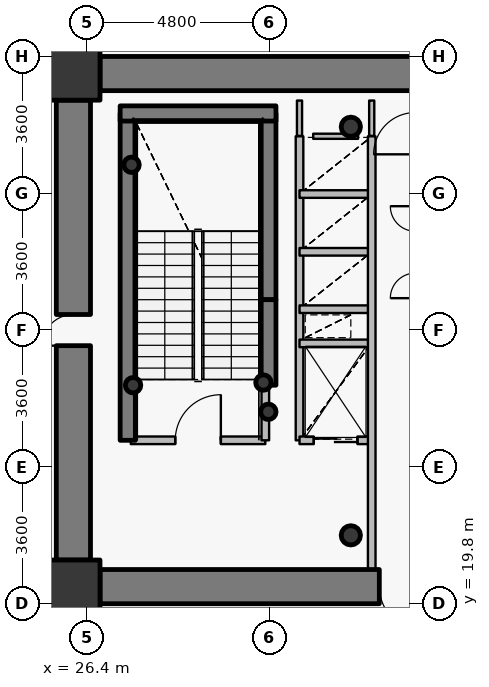
"""IFC4 building model, lengths in metres.
Left out: names, types, materials, properties, quantities, classifications, styles, units other than length and angle.
Written with IfcOpenShell. Run it as: python <this file> out.ifc"""

import sys

from ifc_helpers import new_model, si_unit, direction, frame, frame_2d, origin, origin_2d, place, context, subcontext, project, spatial, rectangle, hollow_circle, extrude, source, transform, mapped, element, fill, save


model = new_model("IFC4")
c1 = context("Model", 3, precision=1e-05, world=origin(), true_north=direction((0.0, 1.0)))
c2 = subcontext(c1, "Body", "Model", "MODEL_VIEW")
j1 = project(units=[si_unit("LENGTHUNIT", "METRE"), si_unit("PLANEANGLEUNIT", "RADIAN")], contexts=[c1])
p1 = place(None, origin())
s1 = spatial("IfcSite", under=j1, at=p1, CompositionType="ELEMENT")
p2 = place(p1, origin())
s2 = spatial("IfcBuilding", under=s1, at=p2, CompositionType="ELEMENT")
p3 = place(p2, frame((0.0, 0.0, 82.8)))
s3 = spatial("IfcBuildingStorey", under=s2, at=p3, CompositionType="ELEMENT", Elevation=82.8)
for number, where, z_axis, x_axis in (
    (1, (26.05, 20.25, 0.0), (0.0, 0.0, 1.0), (1.0, 0.0, 0.0)),
    (2, (26.05, 33.75, 0.0), (0.0, 0.0, 1.0), (1.0, 0.0, 0.0)),
):
    element("IfcColumn", number, at=place(p3, frame(where, z_axis=z_axis, x_axis=x_axis)), inside=s3, PredefinedType="COLUMN", context=c2, shape_type="SweptSolid", body=[
        extrude(rectangle(XDim=1.4, YDim=1.4, at=origin_2d()), origin(), (0.0, 0.0, 1.0), 4.2),
    ])
for number, where, z_axis, x_axis in (
    (3, (33.35, 21.6, 0.0), (0.0, 0.0, 1.0), (1.0, 0.0, 0.0)),
    (4, (33.35, 32.35, 0.0), (0.0, 0.0, 1.0), (1.0, 0.0, 0.0)),
):
    element("IfcColumn", number, at=place(p3, frame(where, z_axis=z_axis, x_axis=x_axis)), inside=s3, PredefinedType="COLUMN", context=c2, shape_type="SweptSolid", body=[
        extrude(hollow_circle(Radius=0.254, WallThickness=0.02, at=origin_2d()), origin(), (0.0, 0.0, 1.0), 4.2),
    ])
p4 = place(p3, frame((27.48, 24.1, 0.0), z_axis=(0.0, 0.0, 1.0), x_axis=(0.0, 1.0, 0.0)))
e5 = element("IfcWall", 5, at=p4, inside=s3, PredefinedType="SHEAR", context=c2, shape_type="SweptSolid", body=[
    extrude(rectangle(XDim=8.6, YDim=0.4, at=frame_2d((4.3, 0.0))), origin(), (0.0, 0.0, 1.0), 4.2),
])
p5 = place(p3, frame((31.18, 27.8, 0.0), z_axis=(0.0, 0.0, 1.0), x_axis=(0.0, 1.0, 0.0)))
e6 = element("IfcWall", 6, at=p5, inside=s3, PredefinedType="SHEAR", context=c2, shape_type="SweptSolid", body=[
    extrude(rectangle(XDim=4.9, YDim=0.4, at=frame_2d((2.45, 0.0))), origin(), (0.0, 0.0, 1.0), 4.2),
])
p6 = place(p3, frame((27.28, 32.7, 0.0), z_axis=(0.0, 0.0, 1.0), x_axis=(1.0, 0.0, 0.0)))
e7 = element("IfcWall", 7, at=p6, inside=s3, PredefinedType="SHEAR", context=c2, shape_type="SweptSolid", body=[
    extrude(rectangle(XDim=4.1, YDim=0.4, at=frame_2d((2.05, 0.0))), origin(), (0.0, 0.0, 1.0), 4.2),
])
for number, where, z_axis, x_axis in (
    (8, (27.58, 31.35, 0.0), (0.0, 0.0, 1.0), (1.0, 0.0, 0.0)),
    (9, (31.05, 25.62, 0.0), (0.0, 0.0, 1.0), (1.0, 0.0, 0.0)),
    (10, (31.18, 24.85, 0.0), (0.0, 0.0, 1.0), (1.0, 0.0, 0.0)),
    (11, (27.62, 25.55, 0.0), (0.0, 0.0, 1.0), (1.0, 0.0, 0.0)),
):
    element("IfcColumn", number, at=place(p3, frame(where, z_axis=z_axis, x_axis=x_axis)), inside=s3, PredefinedType="COLUMN", context=c2, shape_type="SweptSolid", body=[
        extrude(hollow_circle(Radius=0.203, WallThickness=0.016, at=origin_2d()), origin(), (0.0, 0.0, 1.0), 4.2),
    ])
p7 = place(p3, frame((26.75, 33.75, 0.0), z_axis=(0.0, 0.0, 1.0), x_axis=(1.0, 0.0, 0.0)))
e12 = element("IfcWall", 12, at=p7, inside=s3, PredefinedType="SHEAR", context=c2, shape_type="SweptSolid", body=[
    extrude(rectangle(XDim=18.5, YDim=0.9, at=frame_2d((9.25, 0.0))), origin(), (0.0, 0.0, 1.0), 3.35),
])
p8 = place(p3, frame((45.25, 20.25, 0.0), z_axis=(0.0, 0.0, 1.0), x_axis=(-1.0, 0.0, 0.0)))
e13 = element("IfcWall", 13, at=p8, inside=s3, PredefinedType="SHEAR", context=c2, shape_type="SweptSolid", body=[
    extrude(rectangle(XDim=18.5, YDim=0.9, at=frame_2d((9.25, 0.0))), origin(), (0.0, 0.0, 1.0), 3.35),
])
p9 = place(p8, frame((10.0, 0.0, 0.0)))
e14 = element("IfcOpeningElement", 14, at=p9, cuts=e13, PredefinedType="OPENING", context=c2, shape_type="SweptSolid", body=[
    extrude(rectangle(XDim=1.15, YDim=2.15, at=origin_2d()), frame((0.575, 0.46, 1.075), z_axis=(0.0, -1.0, 0.0), x_axis=(1.0, 0.0, 0.0)), (0.0, 0.0, 1.0), 0.92),
])
p10 = place(p3, frame((26.05, 20.95, 0.0), z_axis=(0.0, 0.0, 1.0), x_axis=(0.0, 1.0, 0.0)))
e15 = element("IfcWall", 15, at=p10, inside=s3, PredefinedType="SHEAR", context=c2, shape_type="SweptSolid", body=[
    extrude(rectangle(XDim=12.1, YDim=0.9, at=frame_2d((6.05, 0.0))), origin(), (0.0, 0.0, 1.0), 3.35),
])
p11 = place(p10, frame((5.64, 0.0, 0.0)))
e16 = element("IfcOpeningElement", 16, at=p11, cuts=e15, PredefinedType="OPENING", context=c2, shape_type="SweptSolid", body=[
    extrude(rectangle(XDim=0.82, YDim=2.1, at=origin_2d()), frame((0.41, 0.46, 1.05), z_axis=(0.0, -1.0, 0.0), x_axis=(1.0, 0.0, 0.0)), (0.0, 0.0, 1.0), 0.92),
])
p12 = place(p3, frame((31.18, 25.55, 0.0), z_axis=(0.0, 0.0, 1.0), x_axis=(0.0, 1.0, 0.0)))
e17 = element("IfcWall", 17, at=p12, inside=s3, PredefinedType="SHEAR", context=c2, shape_type="SweptSolid", body=[
    extrude(rectangle(XDim=2.25, YDim=0.4, at=frame_2d((1.125, 0.0))), origin(), (0.0, 0.0, 1.0), 3.5),
])
p13 = place(p3, frame((27.56, 24.1, 0.0), z_axis=(0.0, 0.0, 1.0), x_axis=(1.0, 0.0, 0.0)))
e18 = element("IfcWall", 18, at=p13, inside=s3, PredefinedType="PARTITIONING", context=c2, shape_type="SweptSolid", body=[
    extrude(rectangle(XDim=3.54, YDim=0.2, at=frame_2d((1.77, 0.0))), origin(), (0.0, 0.0, 1.0), 3.9),
])
p14 = place(p13, frame((1.17, 0.0, 0.0)))
e19 = element("IfcOpeningElement", 19, at=p14, cuts=e18, PredefinedType="OPENING", context=c2, shape_type="SweptSolid", body=[
    extrude(rectangle(XDim=1.2, YDim=2.15, at=origin_2d()), frame((0.6, 0.11, 1.075), z_axis=(0.0, -1.0, 0.0), x_axis=(1.0, 0.0, 0.0)), (0.0, 0.0, 1.0), 0.22),
])
p15 = place(p3, frame((31.1, 24.1, 0.0), z_axis=(0.0, 0.0, 1.0), x_axis=(0.0, 1.0, 0.0)))
e20 = element("IfcWall", 20, at=p15, inside=s3, PredefinedType="PARTITIONING", context=c2, shape_type="SweptSolid", body=[
    extrude(rectangle(XDim=1.44, YDim=0.2, at=frame_2d((0.72, 0.0))), origin(), (0.0, 0.0, 1.0), 3.9),
])
p16 = place(p3, frame((32.0, 24.1, 0.0), z_axis=(0.0, 0.0, 1.0), x_axis=(0.0, 1.0, 0.0)))
e21 = element("IfcWall", 21, at=p16, inside=s3, PredefinedType="PARTITIONING", context=c2, shape_type="SweptSolid", body=[
    extrude(rectangle(XDim=8.0, YDim=0.2, at=frame_2d((4.0, 0.0))), origin(), (0.0, 0.0, 1.0), 3.9),
])
p17 = place(p3, frame((32.0, 24.1, 0.0), z_axis=(0.0, 0.0, 1.0), x_axis=(1.0, 0.0, 0.0)))
e22 = element("IfcWall", 22, at=p17, inside=s3, PredefinedType="PARTITIONING", context=c2, shape_type="SweptSolid", body=[
    extrude(rectangle(XDim=1.9, YDim=0.2, at=frame_2d((0.95, 0.0))), origin(), (0.0, 0.0, 1.0), 3.485),
])
p18 = place(p17, frame((0.375, 0.0, 0.0)))
e23 = element("IfcOpeningElement", 23, at=p18, cuts=e22, PredefinedType="OPENING", context=c2, shape_type="SweptSolid", body=[
    extrude(rectangle(XDim=1.15, YDim=2.15, at=origin_2d()), frame((0.575, 0.11, 1.075), z_axis=(0.0, -1.0, 0.0), x_axis=(1.0, 0.0, 0.0)), (0.0, 0.0, 1.0), 0.22),
])
for number, where, z_axis, x_axis in (
    (24, (32.0, 26.65, 0.0), (0.0, 0.0, 1.0), (1.0, 0.0, 0.0)),
    (25, (32.0, 27.55, 0.0), (0.0, 0.0, 1.0), (1.0, 0.0, 0.0)),
    (26, (32.0, 29.06, 0.0), (0.0, 0.0, 1.0), (1.0, 0.0, 0.0)),
    (27, (32.0, 30.58, 0.0), (0.0, 0.0, 1.0), (1.0, 0.0, 0.0)),
):
    element("IfcWall", number, at=place(p3, frame(where, z_axis=z_axis, x_axis=x_axis)), inside=s3, PredefinedType="PARTITIONING", context=c2, shape_type="SweptSolid", body=[
        extrude(rectangle(XDim=1.9, YDim=0.2, at=frame_2d((0.95, 0.0))), origin(), (0.0, 0.0, 1.0), 3.485),
    ])
p19 = place(p3, frame((33.9, 20.7, 0.0), z_axis=(0.0, 0.0, 1.0), x_axis=(0.0, 1.0, 0.0)))
e28 = element("IfcWall", 28, at=p19, inside=s3, PredefinedType="PARTITIONING", context=c2, shape_type="SweptSolid", body=[
    extrude(rectangle(XDim=11.4, YDim=0.2, at=frame_2d((5.7, 0.0))), origin(), (0.0, 0.0, 1.0), 3.485),
])
p20 = place(p3, frame((32.36, 32.1, 0.0), z_axis=(0.0, 0.0, 1.0), x_axis=(1.0, 0.0, 0.0)))
e29 = element("IfcWall", 29, at=p20, inside=s3, PredefinedType="PARTITIONING", context=c2, shape_type="SweptSolid", body=[
    extrude(rectangle(XDim=1.18, YDim=0.135, at=frame_2d((0.59, 0.0))), origin(), (0.0, 0.0, 1.0), 3.485),
])
p21 = place(p3, frame((32.0, 33.04, 0.0), z_axis=(0.0, 0.0, 1.0), x_axis=(0.0, -1.0, 0.0)))
e30 = element("IfcWall", 30, at=p21, inside=s3, PredefinedType="PARTITIONING", context=c2, shape_type="SweptSolid", body=[
    extrude(rectangle(XDim=0.93, YDim=0.135, at=frame_2d((0.465, 0.0))), origin(), (0.0, 0.0, 1.0), 3.435),
])
p22 = place(p3, frame((33.9, 32.11, 0.0), z_axis=(0.0, 0.0, 1.0), x_axis=(0.0, 1.0, 0.0)))
e31 = element("IfcWall", 31, at=p22, inside=s3, PredefinedType="PARTITIONING", context=c2, shape_type="SweptSolid", body=[
    extrude(rectangle(XDim=0.93, YDim=0.135, at=frame_2d((0.465, 0.0))), origin(), (0.0, 0.0, 1.0), 3.485),
])
p23 = place(p3, frame((26.74, 34.2, 0.0), z_axis=(0.0, 0.0, 1.0), x_axis=(-1.0, 0.0, 0.0)))
e32 = element("IfcWall", 32, at=p23, inside=s3, PredefinedType="PARTITIONING", context=c2, shape_type="SweptSolid", body=[
    extrude(rectangle(XDim=1.14, YDim=0.135, at=frame_2d((0.57, 0.0))), origin(), (0.0, 0.0, 1.0), 3.235),
])
p24 = place(p3, frame((25.6, 33.893, 0.0), z_axis=(0.0, 0.0, 1.0), x_axis=(0.0, -1.0, 0.0)))
e33 = element("IfcWall", 33, at=p24, inside=s3, PredefinedType="PARTITIONING", context=c2, shape_type="SweptSolid", body=[
    extrude(rectangle(XDim=0.833, YDim=0.135, at=frame_2d((0.416, 0.0))), origin(), (0.0, 0.0, 1.0), 3.9),
])
p25 = place(p3, frame((25.6, 20.94, 0.0), z_axis=(0.0, 0.0, 1.0), x_axis=(0.0, -1.0, 0.0)))
e34 = element("IfcWall", 34, at=p25, inside=s3, PredefinedType="PARTITIONING", context=c2, shape_type="SweptSolid", body=[
    extrude(rectangle(XDim=1.14, YDim=0.135, at=frame_2d((0.57, 0.0))), origin(), (0.0, 0.0, 1.0), 3.9),
])
p26 = place(p3, frame((25.907, 19.8, 0.0), z_axis=(0.0, 0.0, 1.0), x_axis=(1.0, 0.0, 0.0)))
e35 = element("IfcWall", 35, at=p26, inside=s3, PredefinedType="PARTITIONING", context=c2, shape_type="SweptSolid", body=[
    extrude(rectangle(XDim=0.833, YDim=0.135, at=frame_2d((0.416, 0.0))), origin(), (0.0, 0.0, 1.0), 3.235),
])
m1 = source(origin(), c2, "Body", "SweptSolid", [
    extrude(rectangle(XDim=0.82, YDim=2.1, at=origin_2d()), frame((0.41, 0.025, 1.05), z_axis=(0.0, -1.0, 0.0), x_axis=(1.0, 0.0, 0.0)), (0.0, 0.0, 1.0), 0.05),
])
p27 = place(p11, origin())
e36 = element("IfcDoor", 36, at=p27, inside=s3, OperationType="SINGLE_SWING_LEFT", PredefinedType="DOOR", context=c2, shape_type="MappedRepresentation", body=[
    mapped(m1, transform((0.0, 0.0, 0.0), x_axis=(1.0, 0.0, 0.0), y_axis=(0.0, 1.0, 0.0), z_axis=(0.0, 0.0, 1.0), scale=1.0)),
])
fill(e16, e36)
m2 = source(origin(), c2, "Body", "SweptSolid", [
    extrude(rectangle(XDim=1.15, YDim=2.15, at=origin_2d()), frame((0.575, 0.025, 1.075), z_axis=(0.0, -1.0, 0.0), x_axis=(1.0, 0.0, 0.0)), (0.0, 0.0, 1.0), 0.05),
])
p28 = place(p9, origin())
e37 = element("IfcDoor", 37, at=p28, inside=s3, OperationType="SINGLE_SWING_LEFT", PredefinedType="DOOR", context=c2, shape_type="MappedRepresentation", body=[
    mapped(m2, transform((0.0, 0.0, 0.0), x_axis=(1.0, 0.0, 0.0), y_axis=(0.0, 1.0, 0.0), z_axis=(0.0, 0.0, 1.0), scale=1.0)),
])
fill(e14, e37)
m3 = source(origin(), c2, "Body", "SweptSolid", [
    extrude(rectangle(XDim=1.2, YDim=2.15, at=origin_2d()), frame((0.6, 0.025, 1.075), z_axis=(0.0, -1.0, 0.0), x_axis=(1.0, 0.0, 0.0)), (0.0, 0.0, 1.0), 0.05),
])
p29 = place(p14, origin())
e38 = element("IfcDoor", 38, at=p29, inside=s3, OperationType="SINGLE_SWING_RIGHT", PredefinedType="DOOR", context=c2, shape_type="MappedRepresentation", body=[
    mapped(m3, transform((0.0, 0.0, 0.0), x_axis=(1.0, 0.0, 0.0), y_axis=(0.0, 1.0, 0.0), z_axis=(0.0, 0.0, 1.0), scale=1.0)),
])
fill(e19, e38)
m4 = source(origin(), c2, "Body", "SweptSolid", [
    extrude(rectangle(XDim=1.15, YDim=2.15, at=origin_2d()), frame((0.575, 0.025, 1.075), z_axis=(0.0, -1.0, 0.0), x_axis=(1.0, 0.0, 0.0)), (0.0, 0.0, 1.0), 0.05),
])
p30 = place(p18, origin())
e39 = element("IfcDoor", 39, at=p30, inside=s3, OperationType="DOUBLE_DOOR_SLIDING", PredefinedType="USERDEFINED", context=c2, shape_type="MappedRepresentation", body=[
    mapped(m4, transform((0.0, 0.0, 0.0), x_axis=(1.0, 0.0, 0.0), y_axis=(0.0, 1.0, 0.0), z_axis=(0.0, 0.0, 1.0), scale=1.0)),
])
fill(e23, e39)
save(model, sys.argv[1])
